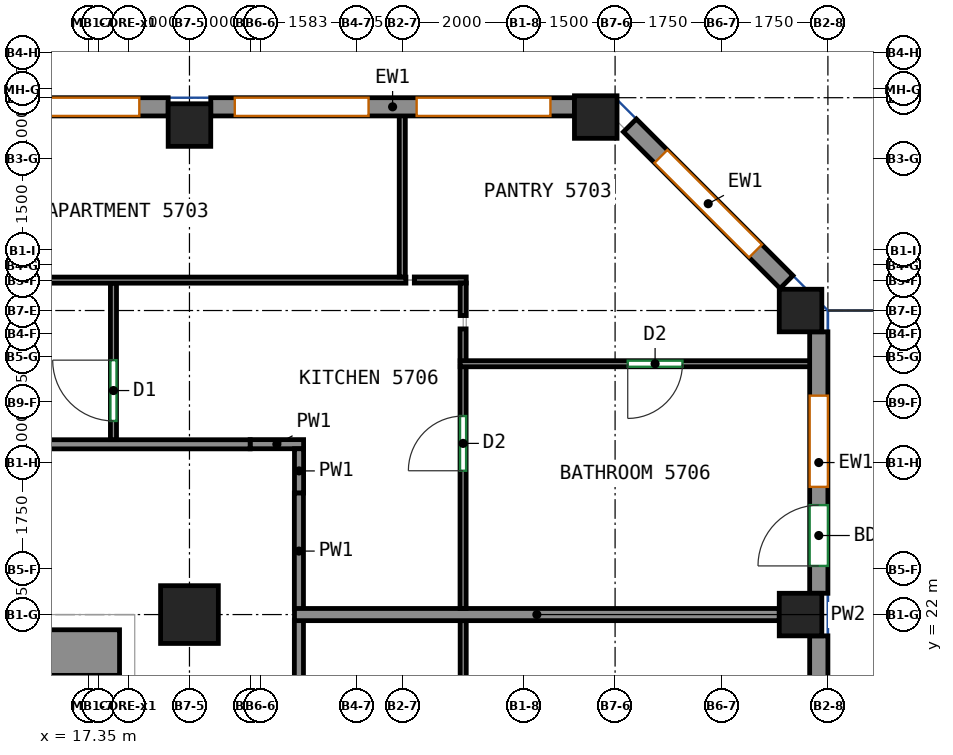
"""IFC4 building model, lengths in metres.
Left out: names, types, materials, properties, quantities, classifications, styles, units other than length and angle.
Written with IfcOpenShell. Run it as: python <this file> out.ifc"""

import sys

from ifc_helpers import new_model, si_unit, direction, frame, frame_2d, origin, origin_2d, place, context, subcontext, project, spatial, rectangle, extrude, source, transform, mapped, element, fill, save


model = new_model("IFC4")
c1 = context("Model", 3, precision=1e-05, world=origin(), true_north=direction((0.0, 1.0)))
c2 = subcontext(c1, "Body", "Model", "MODEL_VIEW")
j1 = project(units=[si_unit("LENGTHUNIT", "METRE"), si_unit("PLANEANGLEUNIT", "RADIAN")], contexts=[c1])
p1 = place(None, origin())
s1 = spatial("IfcSite", under=j1, at=p1, CompositionType="ELEMENT")
p2 = place(p1, origin())
s2 = spatial("IfcBuilding", under=s1, at=p2, CompositionType="ELEMENT")
p3 = place(p2, frame((0.0, 0.0, 239.0)))
s3 = spatial("IfcBuildingStorey", under=s2, at=p3, CompositionType="ELEMENT", Elevation=239.0)
m1 = source(origin(), c2, "Body", "SweptSolid", [
    extrude(rectangle(XDim=0.95, YDim=0.95, at=origin_2d()), origin(), (0.0, 0.0, 1.0), 3.12),
])
p4 = place(p3, frame((19.0, 22.0, 0.0), z_axis=(0.0, 0.0, 1.0), x_axis=(1.0, 0.0, 0.0)))
e1 = element("IfcColumn", 1, at=p4, inside=s3, PredefinedType="COLUMN", context=c2, shape_type="MappedRepresentation", body=[
    mapped(m1, transform((0.0, 0.0, 0.0))),
])
m2 = source(origin(), c2, "Body", "SweptSolid", [
    extrude(rectangle(XDim=0.7, YDim=0.7, at=origin_2d()), origin(), (0.0, 0.0, 1.0), 3.12),
])
for number, where, z_axis, x_axis in (
    (2, (19.0, 30.05, 0.0), (0.0, 0.0, 1.0), (1.0, 0.0, 0.0)),
    (3, (25.682, 30.182, 0.0), (0.0, 0.0, 1.0), (1.0, 0.0, 0.0)),
    (4, (29.05, 22.0, 0.0), (0.0, 0.0, 1.0), (1.0, 0.0, 0.0)),
    (5, (29.05, 27.0, 0.0), (0.0, 0.0, 1.0), (1.0, 0.0, 0.0)),
):
    element("IfcColumn", number, at=place(p3, frame(where, z_axis=z_axis, x_axis=x_axis)), inside=s3, PredefinedType="COLUMN", context=c2, shape_type="MappedRepresentation", body=[
        mapped(m2, transform((0.0, 0.0, 0.0))),
    ])
m3 = source(origin(), c2, "Body", "SweptSolid", [
    extrude(rectangle(XDim=33.6, YDim=0.75, at=frame_2d((16.8, 0.0))), origin(), (0.0, 0.0, 1.0), 3.12),
])
p5 = place(p3, frame((-15.75, 21.375, 0.0), z_axis=(0.0, 0.0, 1.0), x_axis=(1.0, 0.0, 0.0)))
e6 = element("IfcWall", 6, at=p5, inside=s3, PredefinedType="SHEAR", context=c2, shape_type="MappedRepresentation", body=[
    mapped(m3, transform((0.0, 0.0, 0.0))),
])
p6 = place(p5, frame((8.27, 0.0, 0.0)))
e7 = element("IfcOpeningElement", 7, at=p6, cuts=e6, PredefinedType="OPENING", context=c2, shape_type="SweptSolid", body=[
    extrude(rectangle(XDim=0.9, YDim=2.1, at=frame_2d((0.45, 1.05))), frame((0.0, 0.385, 0.0), z_axis=(0.0, -1.0, 0.0), x_axis=(1.0, 0.0, 0.0)), (0.0, 0.0, 1.0), 0.77),
])
p7 = place(p5, frame((14.97, 0.0, 0.0)))
e8 = element("IfcOpeningElement", 8, at=p7, cuts=e6, PredefinedType="OPENING", context=c2, shape_type="SweptSolid", body=[
    extrude(rectangle(XDim=0.9, YDim=2.1, at=frame_2d((0.45, 1.05))), frame((0.0, 0.385, 0.0), z_axis=(0.0, -1.0, 0.0), x_axis=(1.0, 0.0, 0.0)), (0.0, 0.0, 1.0), 0.77),
])
p8 = place(p5, frame((19.794, 0.0, 0.0)))
e9 = element("IfcOpeningElement", 9, at=p8, cuts=e6, PredefinedType="OPENING", context=c2, shape_type="SweptSolid", body=[
    extrude(rectangle(XDim=0.9, YDim=2.1, at=frame_2d((0.45, 1.05))), frame((0.0, 0.385, 0.0), z_axis=(0.0, -1.0, 0.0), x_axis=(1.0, 0.0, 0.0)), (0.0, 0.0, 1.0), 0.77),
])
p9 = place(p5, frame((25.154, 0.0, 0.0)))
e10 = element("IfcOpeningElement", 10, at=p9, cuts=e6, PredefinedType="OPENING", context=c2, shape_type="SweptSolid", body=[
    extrude(rectangle(XDim=0.9, YDim=2.1, at=frame_2d((0.45, 1.05))), frame((0.0, 0.385, 0.0), z_axis=(0.0, -1.0, 0.0), x_axis=(1.0, 0.0, 0.0)), (0.0, 0.0, 1.0), 0.77),
])
p10 = place(p5, frame((2.275, 0.0, 0.0)))
e11 = element("IfcOpeningElement", 11, at=p10, cuts=e6, PredefinedType="OPENING", context=c2, shape_type="SweptSolid", body=[
    extrude(rectangle(XDim=0.9, YDim=2.1, at=frame_2d((0.45, 1.05))), frame((0.0, 0.385, 0.0), z_axis=(0.0, -1.0, 0.0), x_axis=(1.0, 0.0, 0.0)), (0.0, 0.0, 1.0), 0.77),
])
p11 = place(p5, frame((30.425, 0.0, 0.0)))
e12 = element("IfcOpeningElement", 12, at=p11, cuts=e6, PredefinedType="OPENING", context=c2, shape_type="SweptSolid", body=[
    extrude(rectangle(XDim=0.9, YDim=2.1, at=frame_2d((0.45, 1.05))), frame((0.0, 0.385, 0.0), z_axis=(0.0, -1.0, 0.0), x_axis=(1.0, 0.0, 0.0)), (0.0, 0.0, 1.0), 0.77),
])
m4 = source(origin(), c2, "Body", "SweptSolid", [
    extrude(rectangle(XDim=13.3, YDim=0.3, at=frame_2d((6.65, 0.0))), origin(), (0.0, 0.0, 1.0), 3.12),
])
p12 = place(p3, frame((29.35, 8.35, 0.0), z_axis=(0.0, 0.0, 1.0), x_axis=(0.0, 1.0, 0.0)))
e13 = element("IfcWall", 13, at=p12, inside=s3, PredefinedType="SOLIDWALL", context=c2, shape_type="MappedRepresentation", body=[
    mapped(m4, transform((0.0, 0.0, 0.0))),
])
p13 = place(p12, frame((0.913, 0.0, 0.8)))
e14 = element("IfcOpeningElement", 14, at=p13, cuts=e13, PredefinedType="OPENING", context=c2, shape_type="SweptSolid", body=[
    extrude(rectangle(XDim=1.5, YDim=2.05, at=frame_2d((0.75, 1.025))), frame((0.0, 0.16, 0.0), z_axis=(0.0, -1.0, 0.0), x_axis=(1.0, 0.0, 0.0)), (0.0, 0.0, 1.0), 0.32),
])
p14 = place(p12, frame((4.238, 0.0, 0.8)))
e15 = element("IfcOpeningElement", 15, at=p14, cuts=e13, PredefinedType="OPENING", context=c2, shape_type="SweptSolid", body=[
    extrude(rectangle(XDim=1.5, YDim=2.05, at=frame_2d((0.75, 1.025))), frame((0.0, 0.16, 0.0), z_axis=(0.0, -1.0, 0.0), x_axis=(1.0, 0.0, 0.0)), (0.0, 0.0, 1.0), 0.32),
])
p15 = place(p12, frame((7.562, 0.0, 0.8)))
e16 = element("IfcOpeningElement", 16, at=p15, cuts=e13, PredefinedType="OPENING", context=c2, shape_type="SweptSolid", body=[
    extrude(rectangle(XDim=1.5, YDim=2.05, at=frame_2d((0.75, 1.025))), frame((0.0, 0.16, 0.0), z_axis=(0.0, -1.0, 0.0), x_axis=(1.0, 0.0, 0.0)), (0.0, 0.0, 1.0), 0.32),
])
p16 = place(p12, frame((10.887, 0.0, 0.8)))
e17 = element("IfcOpeningElement", 17, at=p16, cuts=e13, PredefinedType="OPENING", context=c2, shape_type="SweptSolid", body=[
    extrude(rectangle(XDim=1.5, YDim=2.05, at=frame_2d((0.75, 1.025))), frame((0.0, 0.16, 0.0), z_axis=(0.0, -1.0, 0.0), x_axis=(1.0, 0.0, 0.0)), (0.0, 0.0, 1.0), 0.32),
])
m5 = source(origin(), c2, "Body", "SweptSolid", [
    extrude(rectangle(XDim=4.3, YDim=0.3, at=frame_2d((2.15, 0.0))), origin(), (0.0, 0.0, 1.0), 3.12),
])
p17 = place(p3, frame((29.35, 22.35, 0.0), z_axis=(0.0, 0.0, 1.0), x_axis=(0.0, 1.0, 0.0)))
e18 = element("IfcWall", 18, at=p17, inside=s3, PredefinedType="SOLIDWALL", context=c2, shape_type="MappedRepresentation", body=[
    mapped(m5, transform((0.0, 0.0, 0.0))),
])
p18 = place(p17, frame((1.75, 0.0, 0.8)))
e19 = element("IfcOpeningElement", 19, at=p18, cuts=e18, PredefinedType="OPENING", context=c2, shape_type="SweptSolid", body=[
    extrude(rectangle(XDim=1.5, YDim=2.05, at=frame_2d((0.75, 1.025))), frame((0.0, 0.16, 0.0), z_axis=(0.0, -1.0, 0.0), x_axis=(1.0, 0.0, 0.0)), (0.0, 0.0, 1.0), 0.32),
])
p19 = place(p17, frame((0.45, 0.0, 0.0)))
e20 = element("IfcOpeningElement", 20, at=p19, cuts=e18, PredefinedType="OPENING", context=c2, shape_type="SweptSolid", body=[
    extrude(rectangle(XDim=1.0, YDim=2.1, at=frame_2d((0.5, 1.05))), frame((0.0, 0.16, 0.0), z_axis=(0.0, -1.0, 0.0), x_axis=(1.0, 0.0, 0.0)), (0.0, 0.0, 1.0), 0.32),
])
m6 = source(origin(), c2, "Body", "SweptSolid", [
    extrude(rectangle(XDim=3.642, YDim=0.3, at=frame_2d((1.821, 0.0))), origin(), (0.0, 0.0, 1.0), 3.12),
])
p20 = place(p3, frame((28.819, 27.469, 0.0), z_axis=(0.0, 0.0, 1.0), x_axis=(-0.707106781187, 0.707106781187, 0.0)))
e21 = element("IfcWall", 21, at=p20, inside=s3, PredefinedType="SOLIDWALL", context=c2, shape_type="MappedRepresentation", body=[
    mapped(m6, transform((0.0, 0.0, 0.0))),
])
p21 = place(p20, frame((0.721, 0.0, 0.8)))
e22 = element("IfcOpeningElement", 22, at=p21, cuts=e21, PredefinedType="OPENING", context=c2, shape_type="SweptSolid", body=[
    extrude(rectangle(XDim=2.2, YDim=2.05, at=frame_2d((1.1, 1.025))), frame((0.0, 0.16, 0.0), z_axis=(0.0, -1.0, 0.0), x_axis=(1.0, 0.0, 0.0)), (0.0, 0.0, 1.0), 0.32),
])
m7 = source(origin(), c2, "Body", "SweptSolid", [
    extrude(rectangle(XDim=5.982, YDim=0.3, at=frame_2d((2.991, 0.0))), origin(), (0.0, 0.0, 1.0), 3.12),
])
p22 = place(p3, frame((25.332, 30.35, 0.0), z_axis=(0.0, 0.0, 1.0), x_axis=(-1.0, 0.0, 0.0)))
e23 = element("IfcWall", 23, at=p22, inside=s3, PredefinedType="SOLIDWALL", context=c2, shape_type="MappedRepresentation", body=[
    mapped(m7, transform((0.0, 0.0, 0.0))),
])
p23 = place(p22, frame((0.396, 0.0, 0.8)))
e24 = element("IfcOpeningElement", 24, at=p23, cuts=e23, PredefinedType="OPENING", context=c2, shape_type="SweptSolid", body=[
    extrude(rectangle(XDim=2.2, YDim=2.05, at=frame_2d((1.1, 1.025))), frame((0.0, 0.16, 0.0), z_axis=(0.0, -1.0, 0.0), x_axis=(1.0, 0.0, 0.0)), (0.0, 0.0, 1.0), 0.32),
])
p24 = place(p22, frame((3.386, 0.0, 0.8)))
e25 = element("IfcOpeningElement", 25, at=p24, cuts=e23, PredefinedType="OPENING", context=c2, shape_type="SweptSolid", body=[
    extrude(rectangle(XDim=2.2, YDim=2.05, at=frame_2d((1.1, 1.025))), frame((0.0, 0.16, 0.0), z_axis=(0.0, -1.0, 0.0), x_axis=(1.0, 0.0, 0.0)), (0.0, 0.0, 1.0), 0.32),
])
m8 = source(origin(), c2, "Body", "SweptSolid", [
    extrude(rectangle(XDim=6.3, YDim=0.3, at=frame_2d((3.15, 0.0))), origin(), (0.0, 0.0, 1.0), 3.12),
])
p25 = place(p3, frame((18.65, 30.35, 0.0), z_axis=(0.0, 0.0, 1.0), x_axis=(-1.0, 0.0, 0.0)))
e26 = element("IfcWall", 26, at=p25, inside=s3, PredefinedType="SOLIDWALL", context=c2, shape_type="MappedRepresentation", body=[
    mapped(m8, transform((0.0, 0.0, 0.0))),
])
p26 = place(p25, frame((0.475, 0.0, 0.8)))
e27 = element("IfcOpeningElement", 27, at=p26, cuts=e26, PredefinedType="OPENING", context=c2, shape_type="SweptSolid", body=[
    extrude(rectangle(XDim=2.2, YDim=2.05, at=frame_2d((1.1, 1.025))), frame((0.0, 0.16, 0.0), z_axis=(0.0, -1.0, 0.0), x_axis=(1.0, 0.0, 0.0)), (0.0, 0.0, 1.0), 0.32),
])
p27 = place(p25, frame((3.625, 0.0, 0.8)))
e28 = element("IfcOpeningElement", 28, at=p27, cuts=e26, PredefinedType="OPENING", context=c2, shape_type="SweptSolid", body=[
    extrude(rectangle(XDim=2.2, YDim=2.05, at=frame_2d((1.1, 1.025))), frame((0.0, 0.16, 0.0), z_axis=(0.0, -1.0, 0.0), x_axis=(1.0, 0.0, 0.0)), (0.0, 0.0, 1.0), 0.32),
])
p28 = place(p3, frame((20.8, 19.592, 0.0), z_axis=(0.0, 0.0, 1.0), x_axis=(0.0, 1.0, 0.0)))
e29 = element("IfcWall", 29, at=p28, inside=s3, PredefinedType="PARTITIONING", context=c2, shape_type="SweptSolid", body=[
    extrude(rectangle(XDim=2.318, YDim=0.15, at=frame_2d((1.159, 0.0))), origin(), (0.0, 0.0, 1.0), 3.12),
])
p29 = place(p3, frame((20.877, 24.802, 0.0), z_axis=(0.0, 0.0, 1.0), x_axis=(-1.0, 0.0, 0.0)))
e30 = element("IfcWall", 30, at=p29, inside=s3, PredefinedType="PARTITIONING", context=c2, shape_type="SweptSolid", body=[
    extrude(rectangle(XDim=0.879, YDim=0.15, at=frame_2d((0.439, 0.0))), origin(), (0.0, 0.0, 1.0), 3.12),
])
p30 = place(p3, frame((20.802, 23.998, 0.0), z_axis=(0.0, 0.0, 1.0), x_axis=(0.0, 1.0, 0.0)))
e31 = element("IfcWall", 31, at=p30, inside=s3, PredefinedType="PARTITIONING", context=c2, shape_type="SweptSolid", body=[
    extrude(rectangle(XDim=0.729, YDim=0.15, at=frame_2d((0.365, 0.0))), origin(), (0.0, 0.0, 1.0), 3.12),
])
p31 = place(p3, frame((20.8, 22.09, 0.0), z_axis=(0.0, 0.0, 1.0), x_axis=(0.0, 1.0, 0.0)))
e32 = element("IfcWall", 32, at=p31, inside=s3, PredefinedType="PARTITIONING", context=c2, shape_type="SweptSolid", body=[
    extrude(rectangle(XDim=1.908, YDim=0.15, at=frame_2d((0.954, 0.0))), origin(), (0.0, 0.0, 1.0), 3.12),
])
p32 = place(p3, frame((-16.075, 24.8, 0.0), z_axis=(0.0, 0.0, 1.0), x_axis=(1.0, 0.0, 0.0)))
e33 = element("IfcWall", 33, at=p32, inside=s3, PredefinedType="PARTITIONING", context=c2, shape_type="SweptSolid", body=[
    extrude(rectangle(XDim=36.073, YDim=0.15, at=frame_2d((18.037, 0.0))), origin(), (0.0, 0.0, 1.0), 3.12),
])
p33 = place(p32, frame((14.274, 0.0, 0.0)))
e34 = element("IfcOpeningElement", 34, at=p33, cuts=e33, PredefinedType="OPENING", context=c2, shape_type="SweptSolid", body=[
    extrude(rectangle(XDim=0.9, YDim=2.1, at=frame_2d((0.45, 1.05))), frame((0.0, 0.085, 0.0), z_axis=(0.0, -1.0, 0.0), x_axis=(1.0, 0.0, 0.0)), (0.0, 0.0, 1.0), 0.17),
])
p34 = place(p32, frame((28.875, 0.0, 0.0)))
e35 = element("IfcOpeningElement", 35, at=p34, cuts=e33, PredefinedType="OPENING", context=c2, shape_type="SweptSolid", body=[
    extrude(rectangle(XDim=1.0, YDim=2.1, at=frame_2d((0.5, 1.05))), frame((0.0, 0.085, 0.0), z_axis=(0.0, -1.0, 0.0), x_axis=(1.0, 0.0, 0.0)), (0.0, 0.0, 1.0), 0.17),
])
p35 = place(p3, frame((23.502, 19.592, 0.0), z_axis=(0.0, 0.0, 1.0), x_axis=(0.0, 1.0, 0.0)))
e36 = element("IfcWall", 36, at=p35, inside=s3, PredefinedType="PARTITIONING", context=c2, shape_type="SweptSolid", body=[
    extrude(rectangle(XDim=2.308, YDim=0.1, at=frame_2d((1.154, 0.0))), origin(), (0.0, 0.0, 1.0), 3.12),
])
p36 = place(p3, frame((20.727, 22.0, 0.0), z_axis=(0.0, 0.0, 1.0), x_axis=(1.0, 0.0, 0.0)))
e37 = element("IfcWall", 37, at=p36, inside=s3, PredefinedType="PARTITIONING", context=c2, shape_type="SweptSolid", body=[
    extrude(rectangle(XDim=7.973, YDim=0.2, at=frame_2d((3.986, 0.0))), origin(), (0.0, 0.0, 1.0), 2.57),
])
p37 = place(p3, frame((17.75, 24.877, 0.0), z_axis=(0.0, 0.0, 1.0), x_axis=(0.0, 1.0, 0.0)))
e38 = element("IfcWall", 38, at=p37, inside=s3, PredefinedType="PARTITIONING", context=c2, shape_type="SweptSolid", body=[
    extrude(rectangle(XDim=2.573, YDim=0.1, at=frame_2d((1.287, 0.0))), origin(), (0.0, 0.0, 1.0), 3.12),
])
p38 = place(p37, frame((0.307, 0.0, 0.0)))
e39 = element("IfcOpeningElement", 39, at=p38, cuts=e38, PredefinedType="OPENING", context=c2, shape_type="SweptSolid", body=[
    extrude(rectangle(XDim=1.0, YDim=2.1, at=frame_2d((0.5, 1.05))), frame((0.0, 0.06, 0.0), z_axis=(0.0, -1.0, 0.0), x_axis=(1.0, 0.0, 0.0)), (0.0, 0.0, 1.0), 0.12),
])
p39 = place(p3, frame((11.9, 27.5, 0.0), z_axis=(0.0, 0.0, 1.0), x_axis=(1.0, 0.0, 0.0)))
e40 = element("IfcWall", 40, at=p39, inside=s3, PredefinedType="PARTITIONING", context=c2, shape_type="SweptSolid", body=[
    extrude(rectangle(XDim=10.66, YDim=0.1, at=frame_2d((5.33, 0.0))), origin(), (0.0, 0.0, 1.0), 3.12),
])
p40 = place(p39, frame((2.02, 0.0, 0.0)))
e41 = element("IfcOpeningElement", 41, at=p40, cuts=e40, PredefinedType="OPENING", context=c2, shape_type="SweptSolid", body=[
    extrude(rectangle(XDim=1.0, YDim=2.1, at=frame_2d((0.5, 1.05))), frame((0.0, 0.06, 0.0), z_axis=(0.0, -1.0, 0.0), x_axis=(1.0, 0.0, 0.0)), (0.0, 0.0, 1.0), 0.12),
])
p41 = place(p3, frame((23.5, 22.1, 0.0), z_axis=(0.0, 0.0, 1.0), x_axis=(0.0, 1.0, 0.0)))
e42 = element("IfcWall", 42, at=p41, inside=s3, PredefinedType="PARTITIONING", context=c2, shape_type="SweptSolid", body=[
    extrude(rectangle(XDim=3.985, YDim=0.1, at=frame_2d((1.992, 0.0))), origin(), (0.0, 0.0, 1.0), 3.12),
])
p42 = place(p41, frame((2.265, 0.0, 0.0)))
e43 = element("IfcOpeningElement", 43, at=p42, cuts=e42, PredefinedType="OPENING", context=c2, shape_type="SweptSolid", body=[
    extrude(rectangle(XDim=0.9, YDim=2.1, at=frame_2d((0.45, 1.05))), frame((0.0, 0.06, 0.0), z_axis=(0.0, -1.0, 0.0), x_axis=(1.0, 0.0, 0.0)), (0.0, 0.0, 1.0), 0.12),
])
p43 = place(p3, frame((23.552, 27.502, 0.0), z_axis=(0.0, 0.0, 1.0), x_axis=(-1.0, 0.0, 0.0)))
e44 = element("IfcWall", 44, at=p43, inside=s3, PredefinedType="PARTITIONING", context=c2, shape_type="SweptSolid", body=[
    extrude(rectangle(XDim=0.854, YDim=0.1, at=frame_2d((0.427, 0.0))), origin(), (0.0, 0.0, 1.0), 3.12),
])
p44 = place(p3, frame((23.502, 26.917, 0.0), z_axis=(0.0, 0.0, 1.0), x_axis=(0.0, 1.0, 0.0)))
e45 = element("IfcWall", 45, at=p44, inside=s3, PredefinedType="PARTITIONING", context=c2, shape_type="SweptSolid", body=[
    extrude(rectangle(XDim=0.535, YDim=0.1, at=frame_2d((0.268, 0.0))), origin(), (0.0, 0.0, 1.0), 3.12),
])
p45 = place(p3, frame((23.5, 26.165, 0.0), z_axis=(0.0, 0.0, 1.0), x_axis=(0.0, 1.0, 0.0)))
e46 = element("IfcWall", 46, at=p45, inside=s3, PredefinedType="PARTITIONING", context=c2, shape_type="SweptSolid", body=[
    extrude(rectangle(XDim=0.533, YDim=0.1, at=frame_2d((0.267, 0.0))), origin(), (0.0, 0.0, 1.0), 3.12),
])
p46 = place(p3, frame((22.5, 27.552, 0.0), z_axis=(0.0, 0.0, 1.0), x_axis=(0.0, 1.0, 0.0)))
e47 = element("IfcWall", 47, at=p46, inside=s3, PredefinedType="PARTITIONING", context=c2, shape_type="SweptSolid", body=[
    extrude(rectangle(XDim=2.698, YDim=0.1, at=frame_2d((1.349, 0.0))), origin(), (0.0, 0.0, 1.0), 3.12),
])
p47 = place(p3, frame((29.25, 26.125, 0.0), z_axis=(0.0, 0.0, 1.0), x_axis=(-1.0, 0.0, 0.0)))
e48 = element("IfcWall", 48, at=p47, inside=s3, PredefinedType="PARTITIONING", context=c2, shape_type="SweptSolid", body=[
    extrude(rectangle(XDim=5.798, YDim=0.1, at=frame_2d((2.899, 0.0))), origin(), (0.0, 0.0, 1.0), 3.12),
])
p48 = place(p47, frame((2.142, 0.0, 0.0)))
e49 = element("IfcOpeningElement", 49, at=p48, cuts=e48, PredefinedType="OPENING", context=c2, shape_type="SweptSolid", body=[
    extrude(rectangle(XDim=0.9, YDim=2.1, at=frame_2d((0.45, 1.05))), frame((0.0, 0.06, 0.0), z_axis=(0.0, -1.0, 0.0), x_axis=(1.0, 0.0, 0.0)), (0.0, 0.0, 1.0), 0.12),
])
p49 = place(p18, origin())
e50 = element("IfcWindow", 50, at=p49, inside=s3, PartitioningType="SINGLE_PANEL", PredefinedType="WINDOW", context=c2, shape_type="SweptSolid", body=[
    extrude(rectangle(XDim=1.5, YDim=2.05, at=frame_2d((0.75, 1.025))), frame((0.0, 0.03, 0.0), z_axis=(0.0, -1.0, 0.0), x_axis=(1.0, 0.0, 0.0)), (0.0, 0.0, 1.0), 0.06),
])
fill(e19, e50)
p50 = place(p19, origin())
e51 = element("IfcDoor", 51, at=p50, inside=s3, OperationType="SINGLE_SWING_LEFT", PredefinedType="DOOR", context=c2, shape_type="SweptSolid", body=[
    extrude(rectangle(XDim=1.0, YDim=2.1, at=frame_2d((0.5, 1.05))), frame((0.0, 0.025, 0.0), z_axis=(0.0, -1.0, 0.0), x_axis=(1.0, 0.0, 0.0)), (0.0, 0.0, 1.0), 0.05),
])
fill(e20, e51)
p51 = place(p21, origin())
e52 = element("IfcWindow", 52, at=p51, inside=s3, PartitioningType="SINGLE_PANEL", PredefinedType="WINDOW", context=c2, shape_type="SweptSolid", body=[
    extrude(rectangle(XDim=2.2, YDim=2.05, at=frame_2d((1.1, 1.025))), frame((0.0, 0.03, 0.0), z_axis=(0.0, -1.0, 0.0), x_axis=(1.0, 0.0, 0.0)), (0.0, 0.0, 1.0), 0.06),
])
fill(e22, e52)
p52 = place(p23, origin())
e53 = element("IfcWindow", 53, at=p52, inside=s3, PartitioningType="SINGLE_PANEL", PredefinedType="WINDOW", context=c2, shape_type="SweptSolid", body=[
    extrude(rectangle(XDim=2.2, YDim=2.05, at=frame_2d((1.1, 1.025))), frame((0.0, 0.03, 0.0), z_axis=(0.0, -1.0, 0.0), x_axis=(1.0, 0.0, 0.0)), (0.0, 0.0, 1.0), 0.06),
])
fill(e24, e53)
p53 = place(p24, origin())
e54 = element("IfcWindow", 54, at=p53, inside=s3, PartitioningType="SINGLE_PANEL", PredefinedType="WINDOW", context=c2, shape_type="SweptSolid", body=[
    extrude(rectangle(XDim=2.2, YDim=2.05, at=frame_2d((1.1, 1.025))), frame((0.0, 0.03, 0.0), z_axis=(0.0, -1.0, 0.0), x_axis=(1.0, 0.0, 0.0)), (0.0, 0.0, 1.0), 0.06),
])
fill(e25, e54)
p54 = place(p26, origin())
e55 = element("IfcWindow", 55, at=p54, inside=s3, PartitioningType="SINGLE_PANEL", PredefinedType="WINDOW", context=c2, shape_type="SweptSolid", body=[
    extrude(rectangle(XDim=2.2, YDim=2.05, at=frame_2d((1.1, 1.025))), frame((0.0, 0.03, 0.0), z_axis=(0.0, -1.0, 0.0), x_axis=(1.0, 0.0, 0.0)), (0.0, 0.0, 1.0), 0.06),
])
fill(e27, e55)
p55 = place(p42, origin())
e56 = element("IfcDoor", 56, at=p55, inside=s3, OperationType="SINGLE_SWING_LEFT", PredefinedType="DOOR", context=c2, shape_type="SweptSolid", body=[
    extrude(rectangle(XDim=0.9, YDim=2.1, at=frame_2d((0.45, 1.05))), frame((0.0, 0.025, 0.0), z_axis=(0.0, -1.0, 0.0), x_axis=(1.0, 0.0, 0.0)), (0.0, 0.0, 1.0), 0.05),
])
fill(e43, e56)
p56 = place(p38, origin())
e57 = element("IfcDoor", 57, at=p56, inside=s3, OperationType="SINGLE_SWING_RIGHT", PredefinedType="DOOR", context=c2, shape_type="SweptSolid", body=[
    extrude(rectangle(XDim=1.0, YDim=2.1, at=frame_2d((0.5, 1.05))), frame((0.0, 0.025, 0.0), z_axis=(0.0, -1.0, 0.0), x_axis=(1.0, 0.0, 0.0)), (0.0, 0.0, 1.0), 0.05),
])
fill(e39, e57)
p57 = place(p48, origin())
e58 = element("IfcDoor", 58, at=p57, inside=s3, OperationType="SINGLE_SWING_RIGHT", PredefinedType="DOOR", context=c2, shape_type="SweptSolid", body=[
    extrude(rectangle(XDim=0.9, YDim=2.1, at=frame_2d((0.45, 1.05))), frame((0.0, 0.025, 0.0), z_axis=(0.0, -1.0, 0.0), x_axis=(1.0, 0.0, 0.0)), (0.0, 0.0, 1.0), 0.05),
])
fill(e49, e58)
save(model, sys.argv[1])
